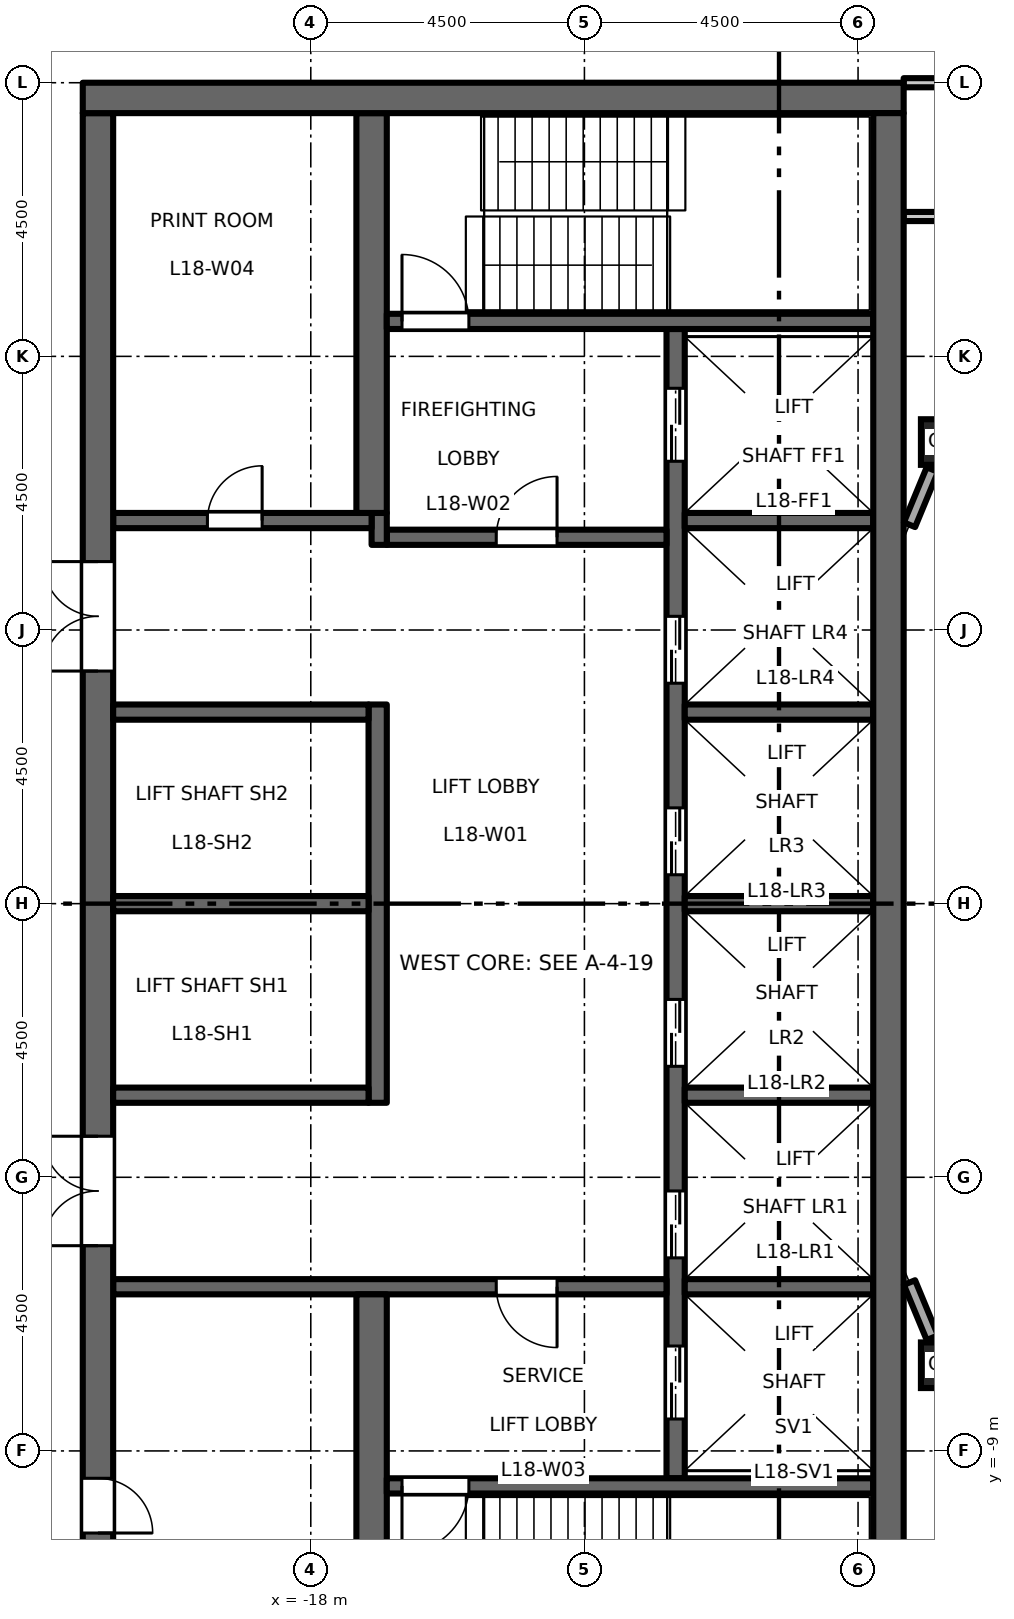
"""IFC4 building model, lengths in metres.
Left out: names, types, materials, properties, quantities, classifications, styles, units other than length and angle.
Written with IfcOpenShell. Run it as: python <this file> out.ifc"""

import sys

from ifc_helpers import new_model, si_unit, direction, frame, frame_2d, origin, origin_2d, place, context, subcontext, project, spatial, rectangle, hollow_rectangle, extrude, element, fill, save


model = new_model("IFC4")
c1 = context("Model", 3, precision=1e-05, world=origin(), true_north=direction((0.0, 1.0)))
c2 = subcontext(c1, "Body", "Model", "MODEL_VIEW")
j1 = project(units=[si_unit("LENGTHUNIT", "METRE"), si_unit("PLANEANGLEUNIT", "RADIAN")], contexts=[c1])
p1 = place(None, origin())
s1 = spatial("IfcSite", under=j1, at=p1, CompositionType="ELEMENT")
p2 = place(p1, origin())
s2 = spatial("IfcBuilding", under=s1, at=p2, CompositionType="ELEMENT")
p3 = place(p2, frame((0.0, 0.0, 85.2)))
s3 = spatial("IfcBuildingStorey", under=s2, at=p3, CompositionType="ELEMENT", Elevation=85.2)
for number, where, z_axis, x_axis in (
    (1, (-7.591, -7.591, 0.0), (0.0, 0.0, 1.0), (1.0, 0.0, 0.0)),
    (2, (-7.591, 7.591, 0.0), (0.0, 0.0, 1.0), (1.0, 0.0, 0.0)),
):
    element("IfcColumn", number, at=place(p3, frame(where, z_axis=z_axis, x_axis=x_axis)), inside=s3, PredefinedType="COLUMN", context=c2, shape_type="SweptSolid", body=[
        extrude(hollow_rectangle(XDim=0.75, YDim=0.75, WallThickness=0.045, at=origin_2d()), origin(), (0.0, 0.0, 1.0), 4.5),
    ])
p4 = place(p3, frame((-12.0, -9.45, 0.0), z_axis=(0.0, 0.0, 1.0), x_axis=(0.0, 1.0, 0.0)))
e3 = element("IfcWall", 3, at=p4, inside=s3, PredefinedType="SHEAR", context=c2, shape_type="SweptSolid", body=[
    extrude(rectangle(XDim=18.9, YDim=0.3, at=frame_2d((9.45, 0.0))), origin(), (0.0, 0.0, 1.0), 4.35),
])
p5 = place(p4, frame((3.625, 0.0, 0.0)))
e4 = element("IfcOpeningElement", 4, at=p5, cuts=e3, PredefinedType="OPENING", context=c2, shape_type="SweptSolid", body=[
    extrude(rectangle(XDim=1.1, YDim=2.1, at=frame_2d((0.55, 1.05))), frame((0.0, 0.16, 0.0), z_axis=(0.0, -1.0, 0.0), x_axis=(1.0, 0.0, 0.0)), (0.0, 0.0, 1.0), 0.32),
])
p6 = place(p4, frame((6.775, 0.0, 0.0)))
e5 = element("IfcOpeningElement", 5, at=p6, cuts=e3, PredefinedType="OPENING", context=c2, shape_type="SweptSolid", body=[
    extrude(rectangle(XDim=1.1, YDim=2.1, at=frame_2d((0.55, 1.05))), frame((0.0, 0.16, 0.0), z_axis=(0.0, -1.0, 0.0), x_axis=(1.0, 0.0, 0.0)), (0.0, 0.0, 1.0), 0.32),
])
p7 = place(p4, frame((9.925, 0.0, 0.0)))
e6 = element("IfcOpeningElement", 6, at=p7, cuts=e3, PredefinedType="OPENING", context=c2, shape_type="SweptSolid", body=[
    extrude(rectangle(XDim=1.1, YDim=2.1, at=frame_2d((0.55, 1.05))), frame((0.0, 0.16, 0.0), z_axis=(0.0, -1.0, 0.0), x_axis=(1.0, 0.0, 0.0)), (0.0, 0.0, 1.0), 0.32),
])
p8 = place(p4, frame((13.075, 0.0, 0.0)))
e7 = element("IfcOpeningElement", 7, at=p8, cuts=e3, PredefinedType="OPENING", context=c2, shape_type="SweptSolid", body=[
    extrude(rectangle(XDim=1.1, YDim=2.1, at=frame_2d((0.55, 1.05))), frame((0.0, 0.16, 0.0), z_axis=(0.0, -1.0, 0.0), x_axis=(1.0, 0.0, 0.0)), (0.0, 0.0, 1.0), 0.32),
])
p9 = place(p4, frame((16.725, 0.0, 0.0)))
e8 = element("IfcOpeningElement", 8, at=p9, cuts=e3, PredefinedType="OPENING", context=c2, shape_type="SweptSolid", body=[
    extrude(rectangle(XDim=1.2, YDim=2.1, at=frame_2d((0.6, 1.05))), frame((0.0, 0.16, 0.0), z_axis=(0.0, -1.0, 0.0), x_axis=(1.0, 0.0, 0.0)), (0.0, 0.0, 1.0), 0.32),
])
p10 = place(p4, frame((0.975, 0.0, 0.0)))
e9 = element("IfcOpeningElement", 9, at=p10, cuts=e3, PredefinedType="OPENING", context=c2, shape_type="SweptSolid", body=[
    extrude(rectangle(XDim=1.2, YDim=2.1, at=frame_2d((0.6, 1.05))), frame((0.0, 0.16, 0.0), z_axis=(0.0, -1.0, 0.0), x_axis=(1.0, 0.0, 0.0)), (0.0, 0.0, 1.0), 0.32),
])
p11 = place(p3, frame((-12.15, 6.025, 0.0), z_axis=(0.0, 0.0, 1.0), x_axis=(-1.0, 0.0, 0.0)))
e10 = element("IfcWall", 10, at=p11, inside=s3, PredefinedType="SHEAR", context=c2, shape_type="SweptSolid", body=[
    extrude(rectangle(XDim=4.6, YDim=0.25, at=frame_2d((2.3, 0.0))), origin(), (0.0, 0.0, 1.0), 4.35),
])
p12 = place(p11, frame((1.8, 0.0, 0.0)))
e11 = element("IfcOpeningElement", 11, at=p12, cuts=e10, PredefinedType="OPENING", context=c2, shape_type="SweptSolid", body=[
    extrude(rectangle(XDim=1.0, YDim=2.1, at=frame_2d((0.5, 1.05))), frame((0.0, 0.135, 0.0), z_axis=(0.0, -1.0, 0.0), x_axis=(1.0, 0.0, 0.0)), (0.0, 0.0, 1.0), 0.27),
])
p13 = place(p3, frame((-16.875, 5.9, 0.0), z_axis=(0.0, 0.0, 1.0), x_axis=(0.0, 1.0, 0.0)))
e12 = element("IfcWall", 12, at=p13, inside=s3, PredefinedType="SHEAR", context=c2, shape_type="SweptSolid", body=[
    extrude(rectangle(XDim=0.525, YDim=0.25, at=frame_2d((0.263, 0.0))), origin(), (0.0, 0.0, 1.0), 4.35),
])
p14 = place(p3, frame((-17.0, 6.3, 0.0), z_axis=(0.0, 0.0, 1.0), x_axis=(-1.0, 0.0, 0.0)))
e13 = element("IfcWall", 13, at=p14, inside=s3, PredefinedType="SHEAR", context=c2, shape_type="SweptSolid", body=[
    extrude(rectangle(XDim=4.25, YDim=0.25, at=frame_2d((2.125, 0.0))), origin(), (0.0, 0.0, 1.0), 4.35),
])
p15 = place(p14, frame((1.8, 0.0, 0.0)))
e14 = element("IfcOpeningElement", 14, at=p15, cuts=e13, PredefinedType="OPENING", context=c2, shape_type="SweptSolid", body=[
    extrude(rectangle(XDim=0.9, YDim=2.1, at=frame_2d((0.45, 1.05))), frame((0.0, 0.135, 0.0), z_axis=(0.0, -1.0, 0.0), x_axis=(1.0, 0.0, 0.0)), (0.0, 0.0, 1.0), 0.27),
])
p16 = place(p3, frame((-12.15, -6.3, 0.0), z_axis=(0.0, 0.0, 1.0), x_axis=(-1.0, 0.0, 0.0)))
e15 = element("IfcWall", 15, at=p16, inside=s3, PredefinedType="SHEAR", context=c2, shape_type="SweptSolid", body=[
    extrude(rectangle(XDim=9.1, YDim=0.25, at=frame_2d((4.55, 0.0))), origin(), (0.0, 0.0, 1.0), 4.35),
])
p17 = place(p16, frame((1.8, 0.0, 0.0)))
e16 = element("IfcOpeningElement", 16, at=p17, cuts=e15, PredefinedType="OPENING", context=c2, shape_type="SweptSolid", body=[
    extrude(rectangle(XDim=1.0, YDim=2.1, at=frame_2d((0.5, 1.05))), frame((0.0, 0.135, 0.0), z_axis=(0.0, -1.0, 0.0), x_axis=(1.0, 0.0, 0.0)), (0.0, 0.0, 1.0), 0.27),
])
p18 = place(p3, frame((-21.5, -13.0, 0.0), z_axis=(0.0, 0.0, 1.0), x_axis=(0.0, 1.0, 0.0)))
e17 = element("IfcWall", 17, at=p18, inside=s3, PredefinedType="SHEAR", context=c2, shape_type="SweptSolid", body=[
    extrude(rectangle(XDim=26.0, YDim=0.5, at=frame_2d((13.0, 0.0))), origin(), (0.0, 0.0, 1.0), 4.35),
])
p19 = place(p18, frame((16.825, 0.0, 0.0)))
e18 = element("IfcOpeningElement", 18, at=p19, cuts=e17, PredefinedType="OPENING", context=c2, shape_type="SweptSolid", body=[
    extrude(rectangle(XDim=1.8, YDim=2.1, at=frame_2d((0.9, 1.05))), frame((0.0, 0.26, 0.0), z_axis=(0.0, -1.0, 0.0), x_axis=(1.0, 0.0, 0.0)), (0.0, 0.0, 1.0), 0.52),
])
p20 = place(p18, frame((7.375, 0.0, 0.0)))
e19 = element("IfcOpeningElement", 19, at=p20, cuts=e17, PredefinedType="OPENING", context=c2, shape_type="SweptSolid", body=[
    extrude(rectangle(XDim=1.8, YDim=2.1, at=frame_2d((0.9, 1.05))), frame((0.0, 0.26, 0.0), z_axis=(0.0, -1.0, 0.0), x_axis=(1.0, 0.0, 0.0)), (0.0, 0.0, 1.0), 0.52),
])
p21 = place(p18, frame((2.65, 0.0, 0.0)))
e20 = element("IfcOpeningElement", 20, at=p21, cuts=e17, PredefinedType="OPENING", context=c2, shape_type="SweptSolid", body=[
    extrude(rectangle(XDim=0.9, YDim=2.1, at=frame_2d((0.45, 1.05))), frame((0.0, 0.26, 0.0), z_axis=(0.0, -1.0, 0.0), x_axis=(1.0, 0.0, 0.0)), (0.0, 0.0, 1.0), 0.52),
])
p22 = place(p3, frame((-16.9, -3.275, 0.0), z_axis=(0.0, 0.0, 1.0), x_axis=(0.0, 1.0, 0.0)))
e21 = element("IfcWall", 21, at=p22, inside=s3, PredefinedType="SHEAR", context=c2, shape_type="SweptSolid", body=[
    extrude(rectangle(XDim=6.55, YDim=0.3, at=frame_2d((3.275, 0.0))), origin(), (0.0, 0.0, 1.0), 4.35),
])
for number, where, z_axis, x_axis in (
    (22, (-17.05, 0.0, 0.0), (0.0, 0.0, 1.0), (-1.0, 0.0, 0.0)),
    (23, (-17.05, 3.15, 0.0), (0.0, 0.0, 1.0), (-1.0, 0.0, 0.0)),
    (24, (-17.05, -3.15, 0.0), (0.0, 0.0, 1.0), (-1.0, 0.0, 0.0)),
):
    element("IfcWall", number, at=place(p3, frame(where, z_axis=z_axis, x_axis=x_axis)), inside=s3, PredefinedType="SHEAR", context=c2, shape_type="SweptSolid", body=[
        extrude(rectangle(XDim=4.2, YDim=0.25, at=frame_2d((2.1, 0.0))), origin(), (0.0, 0.0, 1.0), 4.35),
    ])
for number, where, z_axis, x_axis in (
    (25, (-17.0, 6.425, 0.0), (0.0, 0.0, 1.0), (0.0, 1.0, 0.0)),
    (26, (-17.0, -13.0, 0.0), (0.0, 0.0, 1.0), (0.0, 1.0, 0.0)),
):
    element("IfcWall", number, at=place(p3, frame(where, z_axis=z_axis, x_axis=x_axis)), inside=s3, PredefinedType="SHEAR", context=c2, shape_type="SweptSolid", body=[
        extrude(rectangle(XDim=6.575, YDim=0.5, at=frame_2d((3.288, 0.0))), origin(), (0.0, 0.0, 1.0), 4.35),
    ])
for number, where, z_axis, x_axis in (
    (27, (-8.75, 0.0, 0.0), (0.0, 0.0, 1.0), (-1.0, 0.0, 0.0)),
    (28, (-8.75, 3.15, 0.0), (0.0, 0.0, 1.0), (-1.0, 0.0, 0.0)),
    (29, (-8.75, 6.3, 0.0), (0.0, 0.0, 1.0), (-1.0, 0.0, 0.0)),
    (30, (-8.75, -3.15, 0.0), (0.0, 0.0, 1.0), (-1.0, 0.0, 0.0)),
    (31, (-8.75, -6.3, 0.0), (0.0, 0.0, 1.0), (-1.0, 0.0, 0.0)),
):
    element("IfcWall", number, at=place(p3, frame(where, z_axis=z_axis, x_axis=x_axis)), inside=s3, PredefinedType="SHEAR", context=c2, shape_type="SweptSolid", body=[
        extrude(rectangle(XDim=3.1, YDim=0.25, at=frame_2d((1.55, 0.0))), origin(), (0.0, 0.0, 1.0), 4.35),
    ])
p23 = place(p3, frame((-8.75, 9.575, 0.0), z_axis=(0.0, 0.0, 1.0), x_axis=(-1.0, 0.0, 0.0)))
e32 = element("IfcWall", 32, at=p23, inside=s3, PredefinedType="SHEAR", context=c2, shape_type="SweptSolid", body=[
    extrude(rectangle(XDim=8.0, YDim=0.25, at=frame_2d((4.0, 0.0))), origin(), (0.0, 0.0, 1.0), 4.35),
])
p24 = place(p23, frame((6.65, 0.0, 0.0)))
e33 = element("IfcOpeningElement", 33, at=p24, cuts=e32, PredefinedType="OPENING", context=c2, shape_type="SweptSolid", body=[
    extrude(rectangle(XDim=1.1, YDim=2.1, at=frame_2d((0.55, 1.05))), frame((0.0, 0.135, 0.0), z_axis=(0.0, -1.0, 0.0), x_axis=(1.0, 0.0, 0.0)), (0.0, 0.0, 1.0), 0.27),
])
p25 = place(p3, frame((-8.75, -9.575, 0.0), z_axis=(0.0, 0.0, 1.0), x_axis=(-1.0, 0.0, 0.0)))
e34 = element("IfcWall", 34, at=p25, inside=s3, PredefinedType="SHEAR", context=c2, shape_type="SweptSolid", body=[
    extrude(rectangle(XDim=8.0, YDim=0.25, at=frame_2d((4.0, 0.0))), origin(), (0.0, 0.0, 1.0), 4.35),
])
p26 = place(p25, frame((6.65, 0.0, 0.0)))
e35 = element("IfcOpeningElement", 35, at=p26, cuts=e34, PredefinedType="OPENING", context=c2, shape_type="SweptSolid", body=[
    extrude(rectangle(XDim=1.1, YDim=2.1, at=frame_2d((0.55, 1.05))), frame((0.0, 0.135, 0.0), z_axis=(0.0, -1.0, 0.0), x_axis=(1.0, 0.0, 0.0)), (0.0, 0.0, 1.0), 0.27),
])
p27 = place(p3, frame((-8.25, 13.25, 0.0), z_axis=(0.0, 0.0, 1.0), x_axis=(-1.0, 0.0, 0.0)))
e36 = element("IfcWall", 36, at=p27, inside=s3, PredefinedType="SHEAR", context=c2, shape_type="SweptSolid", body=[
    extrude(rectangle(XDim=13.5, YDim=0.5, at=frame_2d((6.75, 0.0))), origin(), (0.0, 0.0, 1.0), 4.35),
])
p28 = place(p3, frame((-8.5, -13.0, 0.0), z_axis=(0.0, 0.0, 1.0), x_axis=(0.0, 1.0, 0.0)))
e37 = element("IfcWall", 37, at=p28, inside=s3, PredefinedType="SHEAR", context=c2, shape_type="SweptSolid", body=[
    extrude(rectangle(XDim=26.0, YDim=0.5, at=frame_2d((13.0, 0.0))), origin(), (0.0, 0.0, 1.0), 4.35),
])
for number, where, z_axis, x_axis in (
    (38, (-7.779, 7.138, 0.0), (0.0, 0.0, 1.0), (-0.383, -0.924, 0.0)),
    (39, (-8.154, -6.231, 0.0), (0.0, 0.0, 1.0), (0.383, -0.924, 0.0)),
):
    element("IfcWall", number, at=place(p3, frame(where, z_axis=z_axis, x_axis=x_axis)), inside=s3, PredefinedType="STANDARD", context=c2, shape_type="SweptSolid", body=[
        extrude(rectangle(XDim=0.982, YDim=0.2, at=frame_2d((0.491, 0.0))), origin(), (0.0, 0.0, 1.0), 3.73),
    ])
p29 = place(p3, frame((-8.25, 11.3, 0.0), z_axis=(0.0, 0.0, 1.0), x_axis=(1.0, 0.0, 0.0)))
e40 = element("IfcWall", 40, at=p29, inside=s3, PredefinedType="PARTITIONING", context=c2, shape_type="SweptSolid", body=[
    extrude(rectangle(XDim=15.17, YDim=0.15, at=frame_2d((7.585, 0.0))), origin(), (0.0, 0.0, 1.0), 4.35),
])
p30 = place(p29, frame((2.65, 0.0, 0.0)))
e41 = element("IfcOpeningElement", 41, at=p30, cuts=e40, PredefinedType="OPENING", context=c2, shape_type="SweptSolid", body=[
    extrude(rectangle(XDim=1.0, YDim=2.1, at=frame_2d((0.5, 1.05))), frame((0.0, 0.085, 0.0), z_axis=(0.0, -1.0, 0.0), x_axis=(1.0, 0.0, 0.0)), (0.0, 0.0, 1.0), 0.17),
])
p31 = place(p29, frame((8.9, 0.0, 0.0)))
e42 = element("IfcOpeningElement", 42, at=p31, cuts=e40, PredefinedType="OPENING", context=c2, shape_type="SweptSolid", body=[
    extrude(rectangle(XDim=1.0, YDim=2.1, at=frame_2d((0.5, 1.05))), frame((0.0, 0.085, 0.0), z_axis=(0.0, -1.0, 0.0), x_axis=(1.0, 0.0, 0.0)), (0.0, 0.0, 1.0), 0.17),
])
p32 = place(p29, frame((13.4, 0.0, 0.0)))
e43 = element("IfcOpeningElement", 43, at=p32, cuts=e40, PredefinedType="OPENING", context=c2, shape_type="SweptSolid", body=[
    extrude(rectangle(XDim=1.0, YDim=2.1, at=frame_2d((0.5, 1.05))), frame((0.0, 0.085, 0.0), z_axis=(0.0, -1.0, 0.0), x_axis=(1.0, 0.0, 0.0)), (0.0, 0.0, 1.0), 0.17),
])
p33 = place(p3, frame((-8.25, 13.5, 0.0), z_axis=(0.0, 0.0, 1.0), x_axis=(1.0, 0.0, 0.0)))
e44 = element("IfcWall", 44, at=p33, inside=s3, PredefinedType="PARTITIONING", context=c2, shape_type="SweptSolid", body=[
    extrude(rectangle(XDim=16.5, YDim=0.15, at=frame_2d((8.25, 0.0))), origin(), (0.0, 0.0, 1.0), 3.85),
])
p34 = place(p33, frame((7.65, 0.0, 0.0)))
e45 = element("IfcOpeningElement", 45, at=p34, cuts=e44, PredefinedType="OPENING", context=c2, shape_type="SweptSolid", body=[
    extrude(rectangle(XDim=1.0, YDim=2.1, at=frame_2d((0.5, 1.05))), frame((0.0, 0.085, 0.0), z_axis=(0.0, -1.0, 0.0), x_axis=(1.0, 0.0, 0.0)), (0.0, 0.0, 1.0), 0.17),
])
p35 = place(p12, origin())
e46 = element("IfcDoor", 46, at=p35, inside=s3, OperationType="SINGLE_SWING_LEFT", PredefinedType="DOOR", context=c2, shape_type="SweptSolid", body=[
    extrude(rectangle(XDim=1.0, YDim=2.1, at=frame_2d((0.5, 1.05))), frame((0.0, 0.025, 0.0), z_axis=(0.0, -1.0, 0.0), x_axis=(1.0, 0.0, 0.0)), (0.0, 0.0, 1.0), 0.05),
])
fill(e11, e46)
p36 = place(p17, origin())
e47 = element("IfcDoor", 47, at=p36, inside=s3, OperationType="SINGLE_SWING_RIGHT", PredefinedType="DOOR", context=c2, shape_type="SweptSolid", body=[
    extrude(rectangle(XDim=1.0, YDim=2.1, at=frame_2d((0.5, 1.05))), frame((0.0, 0.025, 0.0), z_axis=(0.0, -1.0, 0.0), x_axis=(1.0, 0.0, 0.0)), (0.0, 0.0, 1.0), 0.05),
])
fill(e16, e47)
p37 = place(p24, origin())
e48 = element("IfcDoor", 48, at=p37, inside=s3, OperationType="SINGLE_SWING_RIGHT", PredefinedType="DOOR", context=c2, shape_type="SweptSolid", body=[
    extrude(rectangle(XDim=1.1, YDim=2.1, at=frame_2d((0.55, 1.05))), frame((0.0, 0.025, 0.0), z_axis=(0.0, -1.0, 0.0), x_axis=(1.0, 0.0, 0.0)), (0.0, 0.0, 1.0), 0.05),
])
fill(e33, e48)
p38 = place(p26, origin())
e49 = element("IfcDoor", 49, at=p38, inside=s3, OperationType="SINGLE_SWING_LEFT", PredefinedType="DOOR", context=c2, shape_type="SweptSolid", body=[
    extrude(rectangle(XDim=1.1, YDim=2.1, at=frame_2d((0.55, 1.05))), frame((0.0, 0.025, 0.0), z_axis=(0.0, -1.0, 0.0), x_axis=(1.0, 0.0, 0.0)), (0.0, 0.0, 1.0), 0.05),
])
fill(e35, e49)
p39 = place(p19, origin())
e50 = element("IfcDoor", 50, at=p39, inside=s3, OperationType="DOUBLE_DOOR_DOUBLE_SWING", PredefinedType="DOOR", context=c2, shape_type="SweptSolid", body=[
    extrude(rectangle(XDim=1.8, YDim=2.1, at=frame_2d((0.9, 1.05))), frame((0.0, 0.025, 0.0), z_axis=(0.0, -1.0, 0.0), x_axis=(1.0, 0.0, 0.0)), (0.0, 0.0, 1.0), 0.05),
])
fill(e18, e50)
p40 = place(p20, origin())
e51 = element("IfcDoor", 51, at=p40, inside=s3, OperationType="DOUBLE_DOOR_DOUBLE_SWING", PredefinedType="DOOR", context=c2, shape_type="SweptSolid", body=[
    extrude(rectangle(XDim=1.8, YDim=2.1, at=frame_2d((0.9, 1.05))), frame((0.0, 0.025, 0.0), z_axis=(0.0, -1.0, 0.0), x_axis=(1.0, 0.0, 0.0)), (0.0, 0.0, 1.0), 0.05),
])
fill(e19, e51)
p41 = place(p5, origin())
e52 = element("IfcDoor", 52, at=p41, inside=s3, OperationType="DOUBLE_DOOR_SLIDING", PredefinedType="DOOR", context=c2, shape_type="SweptSolid", body=[
    extrude(rectangle(XDim=1.1, YDim=2.1, at=frame_2d((0.55, 1.05))), frame((0.0, 0.025, 0.0), z_axis=(0.0, -1.0, 0.0), x_axis=(1.0, 0.0, 0.0)), (0.0, 0.0, 1.0), 0.05),
])
fill(e4, e52)
p42 = place(p6, origin())
e53 = element("IfcDoor", 53, at=p42, inside=s3, OperationType="DOUBLE_DOOR_SLIDING", PredefinedType="DOOR", context=c2, shape_type="SweptSolid", body=[
    extrude(rectangle(XDim=1.1, YDim=2.1, at=frame_2d((0.55, 1.05))), frame((0.0, 0.025, 0.0), z_axis=(0.0, -1.0, 0.0), x_axis=(1.0, 0.0, 0.0)), (0.0, 0.0, 1.0), 0.05),
])
fill(e5, e53)
p43 = place(p7, origin())
e54 = element("IfcDoor", 54, at=p43, inside=s3, OperationType="DOUBLE_DOOR_SLIDING", PredefinedType="DOOR", context=c2, shape_type="SweptSolid", body=[
    extrude(rectangle(XDim=1.1, YDim=2.1, at=frame_2d((0.55, 1.05))), frame((0.0, 0.025, 0.0), z_axis=(0.0, -1.0, 0.0), x_axis=(1.0, 0.0, 0.0)), (0.0, 0.0, 1.0), 0.05),
])
fill(e6, e54)
p44 = place(p8, origin())
e55 = element("IfcDoor", 55, at=p44, inside=s3, OperationType="DOUBLE_DOOR_SLIDING", PredefinedType="DOOR", context=c2, shape_type="SweptSolid", body=[
    extrude(rectangle(XDim=1.1, YDim=2.1, at=frame_2d((0.55, 1.05))), frame((0.0, 0.025, 0.0), z_axis=(0.0, -1.0, 0.0), x_axis=(1.0, 0.0, 0.0)), (0.0, 0.0, 1.0), 0.05),
])
fill(e7, e55)
p45 = place(p9, origin())
e56 = element("IfcDoor", 56, at=p45, inside=s3, OperationType="DOUBLE_DOOR_SLIDING", PredefinedType="DOOR", context=c2, shape_type="SweptSolid", body=[
    extrude(rectangle(XDim=1.2, YDim=2.1, at=frame_2d((0.6, 1.05))), frame((0.0, 0.025, 0.0), z_axis=(0.0, -1.0, 0.0), x_axis=(1.0, 0.0, 0.0)), (0.0, 0.0, 1.0), 0.05),
])
fill(e8, e56)
p46 = place(p10, origin())
e57 = element("IfcDoor", 57, at=p46, inside=s3, OperationType="DOUBLE_DOOR_SLIDING", PredefinedType="DOOR", context=c2, shape_type="SweptSolid", body=[
    extrude(rectangle(XDim=1.2, YDim=2.1, at=frame_2d((0.6, 1.05))), frame((0.0, 0.025, 0.0), z_axis=(0.0, -1.0, 0.0), x_axis=(1.0, 0.0, 0.0)), (0.0, 0.0, 1.0), 0.05),
])
fill(e9, e57)
p47 = place(p15, origin())
e58 = element("IfcDoor", 58, at=p47, inside=s3, OperationType="SINGLE_SWING_LEFT", PredefinedType="DOOR", context=c2, shape_type="SweptSolid", body=[
    extrude(rectangle(XDim=0.9, YDim=2.1, at=frame_2d((0.45, 1.05))), frame((0.0, 0.025, 0.0), z_axis=(0.0, -1.0, 0.0), x_axis=(1.0, 0.0, 0.0)), (0.0, 0.0, 1.0), 0.05),
])
fill(e14, e58)
p48 = place(p21, origin())
e59 = element("IfcDoor", 59, at=p48, inside=s3, OperationType="SINGLE_SWING_LEFT", PredefinedType="DOOR", context=c2, shape_type="SweptSolid", body=[
    extrude(rectangle(XDim=0.9, YDim=2.1, at=frame_2d((0.45, 1.05))), frame((0.0, 0.025, 0.0), z_axis=(0.0, -1.0, 0.0), x_axis=(1.0, 0.0, 0.0)), (0.0, 0.0, 1.0), 0.05),
])
fill(e20, e59)
save(model, sys.argv[1])
